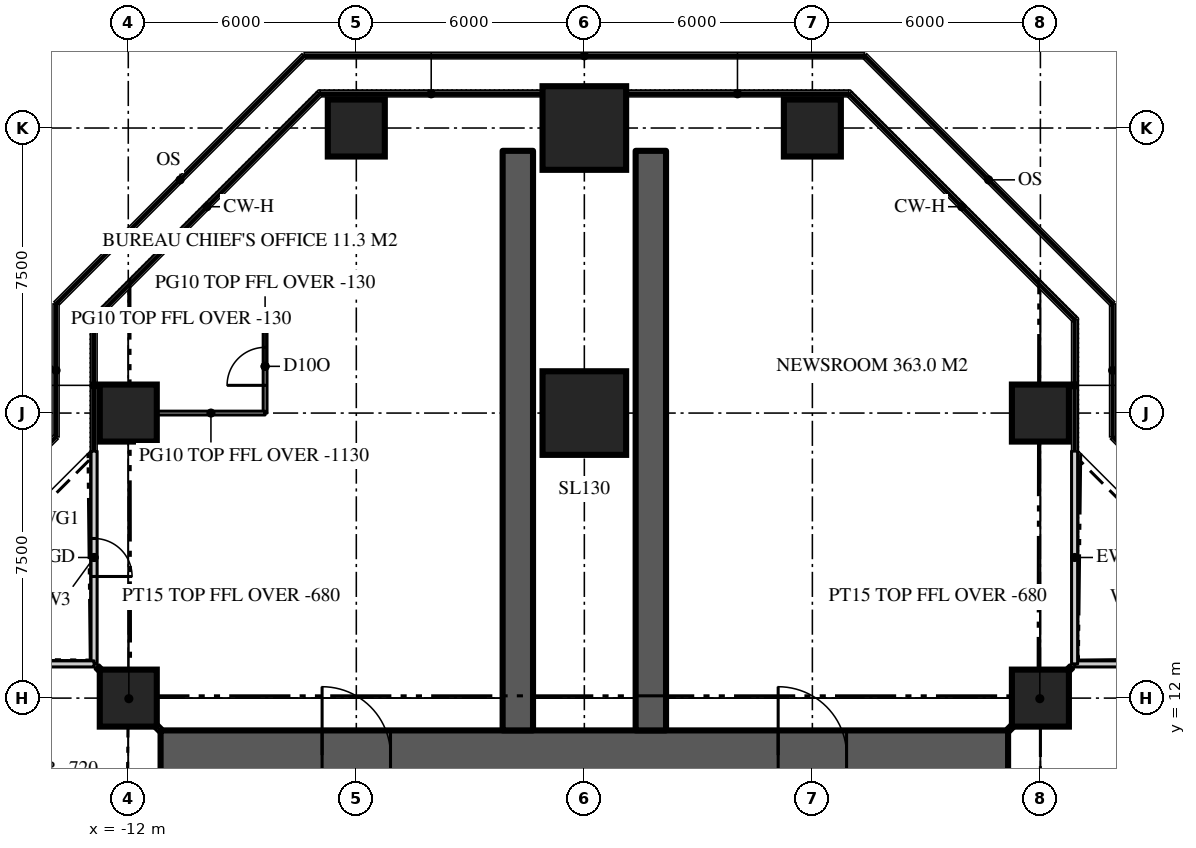
"""IFC4 building model, lengths in metres.
Left out: names, types, materials, properties, quantities, classifications, styles, units other than length and angle.
Written with IfcOpenShell. Run it as: python <this file> out.ifc"""

import sys

from ifc_helpers import new_model, si_unit, direction, frame, frame_2d, origin, origin_2d, place, context, subcontext, project, spatial, rectangle, extrude, element, fill, save


model = new_model("IFC4")
c1 = context("Model", 3, precision=1e-05, world=origin(), true_north=direction((0.0, 1.0)))
c2 = subcontext(c1, "Body", "Model", "MODEL_VIEW")
j1 = project(units=[si_unit("LENGTHUNIT", "METRE"), si_unit("PLANEANGLEUNIT", "RADIAN")], contexts=[c1])
p1 = place(None, origin())
s1 = spatial("IfcSite", under=j1, at=p1, CompositionType="ELEMENT")
p2 = place(p1, origin())
s2 = spatial("IfcBuilding", under=s1, at=p2, CompositionType="ELEMENT")
p3 = place(p2, frame((0.0, 0.0, 243.9)))
s3 = spatial("IfcBuildingStorey", under=s2, at=p3, CompositionType="ELEMENT", Elevation=243.9)
p4 = place(p3, frame((-11.15, 10.5, 0.0), z_axis=(0.0, 0.0, 1.0), x_axis=(1.0, 0.0, 0.0)))
e1 = element("IfcWall", 1, at=p4, inside=s3, PredefinedType="SHEAR", context=c2, shape_type="SweptSolid", body=[
    extrude(rectangle(XDim=22.3, YDim=1.3, at=frame_2d((11.15, 0.0))), origin(), (0.0, 0.0, 1.0), 3.9),
])
p5 = place(p4, frame((4.25, 0.0, 0.0)))
e2 = element("IfcOpeningElement", 2, at=p5, cuts=e1, PredefinedType="OPENING", context=c2, shape_type="SweptSolid", body=[
    extrude(rectangle(XDim=1.8, YDim=2.2, at=frame_2d((0.9, 1.1))), frame((0.0, 0.66, 0.0), z_axis=(0.0, -1.0, 0.0), x_axis=(1.0, 0.0, 0.0)), (0.0, 0.0, 1.0), 1.32),
])
p6 = place(p4, frame((16.25, 0.0, 0.0)))
e3 = element("IfcOpeningElement", 3, at=p6, cuts=e1, PredefinedType="OPENING", context=c2, shape_type="SweptSolid", body=[
    extrude(rectangle(XDim=1.8, YDim=2.2, at=frame_2d((0.9, 1.1))), frame((0.0, 0.66, 0.0), z_axis=(0.0, -1.0, 0.0), x_axis=(1.0, 0.0, 0.0)), (0.0, 0.0, 1.0), 1.32),
])
for number, where, z_axis, x_axis in (
    (4, (1.75, 11.15, 0.0), (0.0, 0.0, 1.0), (0.0, 1.0, 0.0)),
    (5, (-1.75, 11.15, 0.0), (0.0, 0.0, 1.0), (0.0, 1.0, 0.0)),
):
    element("IfcWall", number, at=place(p3, frame(where, z_axis=z_axis, x_axis=x_axis)), inside=s3, PredefinedType="SHEAR", context=c2, shape_type="SweptSolid", body=[
        extrude(rectangle(XDim=15.25, YDim=0.8, at=frame_2d((7.625, 0.0))), origin(), (0.0, 0.0, 1.0), 3.9),
    ])
for number, where, z_axis, x_axis in (
    (6, (-12.0, 12.0, 0.0), (0.0, 0.0, 1.0), (1.0, 0.0, 0.0)),
    (7, (12.0, 12.0, 0.0), (0.0, 0.0, 1.0), (1.0, 0.0, 0.0)),
    (8, (-12.0, 19.5, 0.0), (0.0, 0.0, 1.0), (1.0, 0.0, 0.0)),
):
    element("IfcColumn", number, at=place(p3, frame(where, z_axis=z_axis, x_axis=x_axis)), inside=s3, PredefinedType="COLUMN", context=c2, shape_type="SweptSolid", body=[
        extrude(rectangle(XDim=1.5, YDim=1.5, at=origin_2d()), origin(), (0.0, 0.0, 1.0), 3.9),
    ])
p7 = place(p3, frame((0.0, 19.5, 0.0), z_axis=(0.0, 0.0, 1.0), x_axis=(1.0, 0.0, 0.0)))
e9 = element("IfcColumn", 9, at=p7, inside=s3, PredefinedType="COLUMN", context=c2, shape_type="SweptSolid", body=[
    extrude(rectangle(XDim=2.2, YDim=2.2, at=origin_2d()), origin(), (0.0, 0.0, 1.0), 3.9),
])
for number, where, z_axis, x_axis in (
    (10, (12.0, 19.5, 0.0), (0.0, 0.0, 1.0), (1.0, 0.0, 0.0)),
    (11, (-6.0, 27.0, 0.0), (0.0, 0.0, 1.0), (1.0, 0.0, 0.0)),
):
    element("IfcColumn", number, at=place(p3, frame(where, z_axis=z_axis, x_axis=x_axis)), inside=s3, PredefinedType="COLUMN", context=c2, shape_type="SweptSolid", body=[
        extrude(rectangle(XDim=1.5, YDim=1.5, at=origin_2d()), origin(), (0.0, 0.0, 1.0), 3.9),
    ])
p8 = place(p3, frame((0.0, 27.0, 0.0), z_axis=(0.0, 0.0, 1.0), x_axis=(1.0, 0.0, 0.0)))
e12 = element("IfcColumn", 12, at=p8, inside=s3, PredefinedType="COLUMN", context=c2, shape_type="SweptSolid", body=[
    extrude(rectangle(XDim=2.2, YDim=2.2, at=origin_2d()), origin(), (0.0, 0.0, 1.0), 3.9),
])
p9 = place(p3, frame((6.0, 27.0, 0.0), z_axis=(0.0, 0.0, 1.0), x_axis=(1.0, 0.0, 0.0)))
e13 = element("IfcColumn", 13, at=p9, inside=s3, PredefinedType="COLUMN", context=c2, shape_type="SweptSolid", body=[
    extrude(rectangle(XDim=1.5, YDim=1.5, at=origin_2d()), origin(), (0.0, 0.0, 1.0), 3.9),
])
p10 = place(p3, frame((18.5, 12.9, 0.0), z_axis=(0.0, 0.0, 1.0), x_axis=(-1.0, 0.0, 0.0)))
e14 = element("IfcWall", 14, at=p10, inside=s3, PredefinedType="SOLIDWALL", context=c2, shape_type="SweptSolid", body=[
    extrude(rectangle(XDim=5.6, YDim=0.16, at=frame_2d((2.8, 0.0))), origin(), (0.0, 0.0, 1.0), 3.77),
])
p11 = place(p10, frame((2.3, 0.0, 0.0)))
e15 = element("IfcOpeningElement", 15, at=p11, cuts=e14, PredefinedType="OPENING", context=c2, shape_type="SweptSolid", body=[
    extrude(rectangle(XDim=1.0, YDim=2.2, at=frame_2d((0.5, 1.1))), frame((0.0, 0.09, 0.0), z_axis=(0.0, -1.0, 0.0), x_axis=(1.0, 0.0, 0.0)), (0.0, 0.0, 1.0), 0.18),
])
p12 = place(p3, frame((12.9, 12.9, 0.0), z_axis=(0.0, 0.0, 1.0), x_axis=(0.0, 1.0, 0.0)))
e16 = element("IfcWall", 16, at=p12, inside=s3, PredefinedType="SOLIDWALL", context=c2, shape_type="SweptSolid", body=[
    extrude(rectangle(XDim=5.6, YDim=0.16, at=frame_2d((2.8, 0.0))), origin(), (0.0, 0.0, 1.0), 3.77),
])
p13 = place(p3, frame((-12.9, 18.5, 0.0), z_axis=(0.0, 0.0, 1.0), x_axis=(0.0, -1.0, 0.0)))
e17 = element("IfcWall", 17, at=p13, inside=s3, PredefinedType="SOLIDWALL", context=c2, shape_type="SweptSolid", body=[
    extrude(rectangle(XDim=5.6, YDim=0.16, at=frame_2d((2.8, 0.0))), origin(), (0.0, 0.0, 1.0), 3.77),
])
p14 = place(p13, frame((2.3, 0.0, 0.0)))
e18 = element("IfcOpeningElement", 18, at=p14, cuts=e17, PredefinedType="OPENING", context=c2, shape_type="SweptSolid", body=[
    extrude(rectangle(XDim=1.0, YDim=2.2, at=frame_2d((0.5, 1.1))), frame((0.0, 0.09, 0.0), z_axis=(0.0, -1.0, 0.0), x_axis=(1.0, 0.0, 0.0)), (0.0, 0.0, 1.0), 0.18),
])
p15 = place(p3, frame((-12.9, 12.9, 0.0), z_axis=(0.0, 0.0, 1.0), x_axis=(-1.0, 0.0, 0.0)))
e19 = element("IfcWall", 19, at=p15, inside=s3, PredefinedType="SOLIDWALL", context=c2, shape_type="SweptSolid", body=[
    extrude(rectangle(XDim=5.6, YDim=0.16, at=frame_2d((2.8, 0.0))), origin(), (0.0, 0.0, 1.0), 3.77),
])
p16 = place(p3, frame((-8.4, 19.5, 0.0), z_axis=(0.0, 0.0, 1.0), x_axis=(0.0, 1.0, 0.0)))
e20 = element("IfcWall", 20, at=p16, inside=s3, PredefinedType="PARTITIONING", context=c2, shape_type="SweptSolid", body=[
    extrude(rectangle(XDim=2.459, YDim=0.1, at=frame_2d((1.229, 0.0))), origin(), (0.0, 0.0, 1.0), 3.77),
])
p17 = place(p16, frame((0.729, 0.0, 0.0)))
e21 = element("IfcOpeningElement", 21, at=p17, cuts=e20, PredefinedType="OPENING", context=c2, shape_type="SweptSolid", body=[
    extrude(rectangle(XDim=1.0, YDim=2.2, at=frame_2d((0.5, 1.1))), frame((0.0, 0.06, 0.0), z_axis=(0.0, -1.0, 0.0), x_axis=(1.0, 0.0, 0.0)), (0.0, 0.0, 1.0), 0.12),
])
p18 = place(p3, frame((-8.4, 19.5, 0.0), z_axis=(0.0, 0.0, 1.0), x_axis=(-1.0, 0.0, 0.0)))
e22 = element("IfcWall", 22, at=p18, inside=s3, PredefinedType="PARTITIONING", context=c2, shape_type="SweptSolid", body=[
    extrude(rectangle(XDim=2.85, YDim=0.1, at=frame_2d((1.425, 0.0))), origin(), (0.0, 0.0, 1.0), 2.77),
])
p19 = place(p3, frame((-8.4, 21.959, 0.0), z_axis=(0.0, 0.0, 1.0), x_axis=(-1.0, 0.0, 0.0)))
e23 = element("IfcWall", 23, at=p19, inside=s3, PredefinedType="PARTITIONING", context=c2, shape_type="SweptSolid", body=[
    extrude(rectangle(XDim=4.42, YDim=0.1, at=frame_2d((2.21, 0.0))), origin(), (0.0, 0.0, 1.0), 3.77),
])
for number, where, z_axis, x_axis in (
    (24, (11.15, 11.15, 0.0), (0.0, 0.0, 1.0), (0.707, 0.707, 0.0)),
    (25, (-11.15, 11.15, 0.0), (0.0, 0.0, 1.0), (-0.707, 0.707, 0.0)),
):
    element("IfcWall", number, at=place(p3, frame(where, z_axis=z_axis, x_axis=x_axis)), inside=s3, PredefinedType="PARTITIONING", context=c2, shape_type="SweptSolid", body=[
        extrude(rectangle(XDim=2.362, YDim=0.15, at=frame_2d((1.181, 0.0))), origin(), (0.0, 0.0, 1.0), 3.22),
    ])
p20 = place(p14, origin())
e26 = element("IfcDoor", 26, at=p20, inside=s3, OperationType="SINGLE_SWING_RIGHT", PredefinedType="DOOR", context=c2, shape_type="SweptSolid", body=[
    extrude(rectangle(XDim=1.0, YDim=2.2, at=frame_2d((0.5, 1.1))), frame((0.0, 0.025, 0.0), z_axis=(0.0, -1.0, 0.0), x_axis=(1.0, 0.0, 0.0)), (0.0, 0.0, 1.0), 0.05),
])
fill(e18, e26)
p21 = place(p5, origin())
e27 = element("IfcDoor", 27, at=p21, inside=s3, OperationType="DOUBLE_DOOR_DOUBLE_SWING", PredefinedType="DOOR", context=c2, shape_type="SweptSolid", body=[
    extrude(rectangle(XDim=1.8, YDim=2.2, at=frame_2d((0.9, 1.1))), frame((0.0, 0.025, 0.0), z_axis=(0.0, -1.0, 0.0), x_axis=(1.0, 0.0, 0.0)), (0.0, 0.0, 1.0), 0.05),
])
fill(e2, e27)
p22 = place(p6, origin())
e28 = element("IfcDoor", 28, at=p22, inside=s3, OperationType="DOUBLE_DOOR_DOUBLE_SWING", PredefinedType="DOOR", context=c2, shape_type="SweptSolid", body=[
    extrude(rectangle(XDim=1.8, YDim=2.2, at=frame_2d((0.9, 1.1))), frame((0.0, 0.025, 0.0), z_axis=(0.0, -1.0, 0.0), x_axis=(1.0, 0.0, 0.0)), (0.0, 0.0, 1.0), 0.05),
])
fill(e3, e28)
p23 = place(p17, origin())
e29 = element("IfcDoor", 29, at=p23, inside=s3, OperationType="SINGLE_SWING_LEFT", PredefinedType="DOOR", context=c2, shape_type="SweptSolid", body=[
    extrude(rectangle(XDim=1.0, YDim=2.2, at=frame_2d((0.5, 1.1))), frame((0.0, 0.025, 0.0), z_axis=(0.0, -1.0, 0.0), x_axis=(1.0, 0.0, 0.0)), (0.0, 0.0, 1.0), 0.05),
])
fill(e21, e29)
save(model, sys.argv[1])
